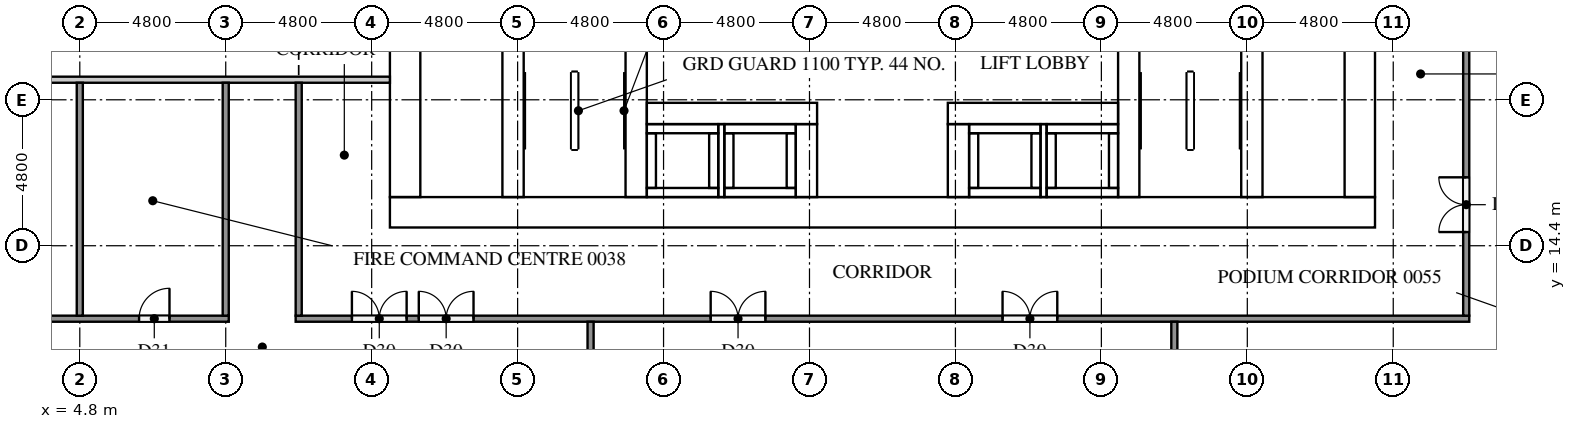
"""IFC4 building model, lengths in metres.
Left out: names, types, materials, properties, quantities, classifications, styles, units other than length and angle.
Written with IfcOpenShell. Run it as: python <this file> out.ifc"""

import sys

from ifc_helpers import new_model, si_unit, direction, frame, frame_2d, origin, place, context, subcontext, project, spatial, rectangle, extrude, element, fill, save


model = new_model("IFC4")
c1 = context("Model", 3, precision=1e-05, world=origin(), true_north=direction((0.0, 1.0)))
c2 = subcontext(c1, "Body", "Model", "MODEL_VIEW")
j1 = project(units=[si_unit("LENGTHUNIT", "METRE"), si_unit("PLANEANGLEUNIT", "RADIAN")], contexts=[c1])
p1 = place(None, origin())
s1 = spatial("IfcSite", under=j1, at=p1, CompositionType="ELEMENT")
p2 = place(p1, origin())
s2 = spatial("IfcBuilding", under=s1, at=p2, CompositionType="ELEMENT")
p3 = place(p2, origin())
s3 = spatial("IfcBuildingStorey", under=s2, at=p3, CompositionType="ELEMENT", Elevation=0.0)
p4 = place(p3, frame((15.0, 15.5, 0.0), z_axis=(0.0, 0.0, 1.0), x_axis=(1.0, 0.0, 0.0)))
e1 = element("IfcWall", 1, at=p4, inside=s3, PredefinedType="SHEAR", context=c2, shape_type="SweptSolid", body=[
    extrude(rectangle(XDim=32.4, YDim=1.0, at=frame_2d((16.2, 0.0))), origin(), (0.0, 0.0, 1.0), 5.7),
])
p5 = place(p4, frame((15.3, 0.0, 0.0)))
e2 = element("IfcOpeningElement", 2, at=p5, cuts=e1, PredefinedType="OPENING", context=c2, shape_type="SweptSolid", body=[
    extrude(rectangle(XDim=1.8, YDim=2.1, at=frame_2d((0.9, 1.05))), frame((0.0, 0.51, 0.0), z_axis=(0.0, -1.0, 0.0), x_axis=(1.0, 0.0, 0.0)), (0.0, 0.0, 1.0), 1.02),
])
p6 = place(p3, frame((15.5, 16.0, 0.0), z_axis=(0.0, 0.0, 1.0), x_axis=(0.0, 1.0, 0.0)))
e3 = element("IfcWall", 3, at=p6, inside=s3, PredefinedType="SHEAR", context=c2, shape_type="SweptSolid", body=[
    extrude(rectangle(XDim=20.8, YDim=1.0, at=frame_2d((10.4, 0.0))), origin(), (0.0, 0.0, 1.0), 5.7),
])
p7 = place(p6, frame((4.76, 0.0, 0.0)))
e4 = element("IfcOpeningElement", 4, at=p7, cuts=e3, PredefinedType="OPENING", context=c2, shape_type="SweptSolid", body=[
    extrude(rectangle(XDim=1.2, YDim=2.1, at=frame_2d((0.6, 1.05))), frame((0.0, 0.51, 0.0), z_axis=(0.0, -1.0, 0.0), x_axis=(1.0, 0.0, 0.0)), (0.0, 0.0, 1.0), 1.02),
])
p8 = place(p3, frame((46.9, 16.0, 0.0), z_axis=(0.0, 0.0, 1.0), x_axis=(0.0, 1.0, 0.0)))
e5 = element("IfcWall", 5, at=p8, inside=s3, PredefinedType="SHEAR", context=c2, shape_type="SweptSolid", body=[
    extrude(rectangle(XDim=20.8, YDim=1.0, at=frame_2d((10.4, 0.0))), origin(), (0.0, 0.0, 1.0), 5.7),
])
p9 = place(p8, frame((10.1, 0.0, 0.0)))
e6 = element("IfcOpeningElement", 6, at=p9, cuts=e5, PredefinedType="OPENING", context=c2, shape_type="SweptSolid", body=[
    extrude(rectangle(XDim=1.2, YDim=2.1, at=frame_2d((0.6, 1.05))), frame((0.0, 0.51, 0.0), z_axis=(0.0, -1.0, 0.0), x_axis=(1.0, 0.0, 0.0)), (0.0, 0.0, 1.0), 1.02),
])
p10 = place(p3, frame((19.05, 16.0, 0.0), z_axis=(0.0, 0.0, 1.0), x_axis=(0.0, 1.0, 0.0)))
e7 = element("IfcWall", 7, at=p10, inside=s3, PredefinedType="SHEAR", context=c2, shape_type="SweptSolid", body=[
    extrude(rectangle(XDim=14.9, YDim=0.7, at=frame_2d((7.45, 0.0))), origin(), (0.0, 0.0, 1.0), 5.7),
])
p11 = place(p10, frame((9.45, 0.0, 0.0)))
e8 = element("IfcOpeningElement", 8, at=p11, cuts=e7, PredefinedType="OPENING", context=c2, shape_type="SweptSolid", body=[
    extrude(rectangle(XDim=1.1, YDim=2.1, at=frame_2d((0.55, 1.05))), frame((0.0, 0.36, 0.0), z_axis=(0.0, -1.0, 0.0), x_axis=(1.0, 0.0, 0.0)), (0.0, 0.0, 1.0), 0.72),
])
p12 = place(p10, frame((12.95, 0.0, 0.0)))
e9 = element("IfcOpeningElement", 9, at=p12, cuts=e7, PredefinedType="OPENING", context=c2, shape_type="SweptSolid", body=[
    extrude(rectangle(XDim=1.1, YDim=2.1, at=frame_2d((0.55, 1.05))), frame((0.0, 0.36, 0.0), z_axis=(0.0, -1.0, 0.0), x_axis=(1.0, 0.0, 0.0)), (0.0, 0.0, 1.0), 0.72),
])
p13 = place(p10, frame((0.2, 0.0, 0.0)))
e10 = element("IfcOpeningElement", 10, at=p13, cuts=e7, PredefinedType="OPENING", context=c2, shape_type="SweptSolid", body=[
    extrude(rectangle(XDim=1.2, YDim=2.1, at=frame_2d((0.6, 1.05))), frame((0.0, 0.36, 0.0), z_axis=(0.0, -1.0, 0.0), x_axis=(1.0, 0.0, 0.0)), (0.0, 0.0, 1.0), 0.72),
])
p14 = place(p3, frame((23.1, 16.0, 0.0), z_axis=(0.0, 0.0, 1.0), x_axis=(0.0, 1.0, 0.0)))
e11 = element("IfcWall", 11, at=p14, inside=s3, PredefinedType="SHEAR", context=c2, shape_type="SweptSolid", body=[
    extrude(rectangle(XDim=20.8, YDim=0.7, at=frame_2d((10.4, 0.0))), origin(), (0.0, 0.0, 1.0), 5.7),
])
p15 = place(p3, frame((39.3, 16.0, 0.0), z_axis=(0.0, 0.0, 1.0), x_axis=(0.0, 1.0, 0.0)))
e12 = element("IfcWall", 12, at=p15, inside=s3, PredefinedType="SHEAR", context=c2, shape_type="SweptSolid", body=[
    extrude(rectangle(XDim=8.25, YDim=0.7, at=frame_2d((4.125, 0.0))), origin(), (0.0, 0.0, 1.0), 5.7),
])
p16 = place(p3, frame((43.35, 16.0, 0.0), z_axis=(0.0, 0.0, 1.0), x_axis=(0.0, 1.0, 0.0)))
e13 = element("IfcWall", 13, at=p16, inside=s3, PredefinedType="SHEAR", context=c2, shape_type="SweptSolid", body=[
    extrude(rectangle(XDim=8.25, YDim=0.7, at=frame_2d((4.125, 0.0))), origin(), (0.0, 0.0, 1.0), 5.7),
])
p17 = place(p16, frame((0.2, 0.0, 0.0)))
e14 = element("IfcOpeningElement", 14, at=p17, cuts=e13, PredefinedType="OPENING", context=c2, shape_type="SweptSolid", body=[
    extrude(rectangle(XDim=1.2, YDim=2.1, at=frame_2d((0.6, 1.05))), frame((0.0, 0.36, 0.0), z_axis=(0.0, -1.0, 0.0), x_axis=(1.0, 0.0, 0.0)), (0.0, 0.0, 1.0), 0.72),
])
p18 = place(p3, frame((23.45, 18.75, 0.0), z_axis=(0.0, 0.0, 1.0), x_axis=(1.0, 0.0, 0.0)))
e15 = element("IfcWall", 15, at=p18, inside=s3, PredefinedType="SHEAR", context=c2, shape_type="SweptSolid", body=[
    extrude(rectangle(XDim=5.6, YDim=0.7, at=frame_2d((2.8, 0.0))), origin(), (0.0, 0.0, 1.0), 5.7),
])
p19 = place(p18, frame((0.625, 0.0, 0.0)))
e16 = element("IfcOpeningElement", 16, at=p19, cuts=e15, PredefinedType="OPENING", context=c2, shape_type="SweptSolid", body=[
    extrude(rectangle(XDim=1.1, YDim=2.1, at=frame_2d((0.55, 1.05))), frame((0.0, 0.36, 0.0), z_axis=(0.0, -1.0, 0.0), x_axis=(1.0, 0.0, 0.0)), (0.0, 0.0, 1.0), 0.72),
])
p20 = place(p18, frame((3.175, 0.0, 0.0)))
e17 = element("IfcOpeningElement", 17, at=p20, cuts=e15, PredefinedType="OPENING", context=c2, shape_type="SweptSolid", body=[
    extrude(rectangle(XDim=1.1, YDim=2.1, at=frame_2d((0.55, 1.05))), frame((0.0, 0.36, 0.0), z_axis=(0.0, -1.0, 0.0), x_axis=(1.0, 0.0, 0.0)), (0.0, 0.0, 1.0), 0.72),
])
p21 = place(p3, frame((33.35, 18.75, 0.0), z_axis=(0.0, 0.0, 1.0), x_axis=(1.0, 0.0, 0.0)))
e18 = element("IfcWall", 18, at=p21, inside=s3, PredefinedType="SHEAR", context=c2, shape_type="SweptSolid", body=[
    extrude(rectangle(XDim=5.6, YDim=0.7, at=frame_2d((2.8, 0.0))), origin(), (0.0, 0.0, 1.0), 5.7),
])
p22 = place(p21, frame((1.325, 0.0, 0.0)))
e19 = element("IfcOpeningElement", 19, at=p22, cuts=e18, PredefinedType="OPENING", context=c2, shape_type="SweptSolid", body=[
    extrude(rectangle(XDim=1.1, YDim=2.1, at=frame_2d((0.55, 1.05))), frame((0.0, 0.36, 0.0), z_axis=(0.0, -1.0, 0.0), x_axis=(1.0, 0.0, 0.0)), (0.0, 0.0, 1.0), 0.72),
])
p23 = place(p21, frame((3.875, 0.0, 0.0)))
e20 = element("IfcOpeningElement", 20, at=p23, cuts=e18, PredefinedType="OPENING", context=c2, shape_type="SweptSolid", body=[
    extrude(rectangle(XDim=1.1, YDim=2.1, at=frame_2d((0.55, 1.05))), frame((0.0, 0.36, 0.0), z_axis=(0.0, -1.0, 0.0), x_axis=(1.0, 0.0, 0.0)), (0.0, 0.0, 1.0), 0.72),
])
for number, where, z_axis, x_axis in (
    (21, (28.7, 16.0, 0.0), (0.0, 0.0, 1.0), (0.0, 1.0, 0.0)),
    (22, (33.7, 16.0, 0.0), (0.0, 0.0, 1.0), (0.0, 1.0, 0.0)),
):
    element("IfcWall", number, at=place(p3, frame(where, z_axis=z_axis, x_axis=x_axis)), inside=s3, PredefinedType="SHEAR", context=c2, shape_type="SweptSolid", body=[
        extrude(rectangle(XDim=2.4, YDim=0.7, at=frame_2d((1.2, 0.0))), origin(), (0.0, 0.0, 1.0), 5.7),
    ])
for number, where, z_axis, x_axis in (
    (23, (23.45, 16.15, -1.8), (0.0, 0.0, 1.0), (1.0, 0.0, 0.0)),
    (24, (23.45, 18.25, -1.8), (0.0, 0.0, 1.0), (1.0, 0.0, 0.0)),
):
    element("IfcWall", number, at=place(p3, frame(where, z_axis=z_axis, x_axis=x_axis)), inside=s3, PredefinedType="SOLIDWALL", context=c2, shape_type="SweptSolid", body=[
        extrude(rectangle(XDim=2.35, YDim=0.3, at=frame_2d((1.175, 0.0))), origin(), (0.0, 0.0, 1.0), 1.8),
    ])
for number, where, z_axis, x_axis in (
    (25, (23.6, 16.3, -1.8), (0.0, 0.0, 1.0), (0.0, 1.0, 0.0)),
    (26, (25.65, 16.3, -1.8), (0.0, 0.0, 1.0), (0.0, 1.0, 0.0)),
):
    element("IfcWall", number, at=place(p3, frame(where, z_axis=z_axis, x_axis=x_axis)), inside=s3, PredefinedType="SOLIDWALL", context=c2, shape_type="SweptSolid", body=[
        extrude(rectangle(XDim=1.8, YDim=0.3, at=frame_2d((0.9, 0.0))), origin(), (0.0, 0.0, 1.0), 1.8),
    ])
for number, where, z_axis, x_axis in (
    (27, (26.0, 16.15, -1.8), (0.0, 0.0, 1.0), (1.0, 0.0, 0.0)),
    (28, (26.0, 18.25, -1.8), (0.0, 0.0, 1.0), (1.0, 0.0, 0.0)),
):
    element("IfcWall", number, at=place(p3, frame(where, z_axis=z_axis, x_axis=x_axis)), inside=s3, PredefinedType="SOLIDWALL", context=c2, shape_type="SweptSolid", body=[
        extrude(rectangle(XDim=2.35, YDim=0.3, at=frame_2d((1.175, 0.0))), origin(), (0.0, 0.0, 1.0), 1.8),
    ])
for number, where, z_axis, x_axis in (
    (29, (26.15, 16.3, -1.8), (0.0, 0.0, 1.0), (0.0, 1.0, 0.0)),
    (30, (28.2, 16.3, -1.8), (0.0, 0.0, 1.0), (0.0, 1.0, 0.0)),
):
    element("IfcWall", number, at=place(p3, frame(where, z_axis=z_axis, x_axis=x_axis)), inside=s3, PredefinedType="SOLIDWALL", context=c2, shape_type="SweptSolid", body=[
        extrude(rectangle(XDim=1.8, YDim=0.3, at=frame_2d((0.9, 0.0))), origin(), (0.0, 0.0, 1.0), 1.8),
    ])
for number, where, z_axis, x_axis in (
    (31, (34.05, 16.15, -1.8), (0.0, 0.0, 1.0), (1.0, 0.0, 0.0)),
    (32, (34.05, 18.25, -1.8), (0.0, 0.0, 1.0), (1.0, 0.0, 0.0)),
):
    element("IfcWall", number, at=place(p3, frame(where, z_axis=z_axis, x_axis=x_axis)), inside=s3, PredefinedType="SOLIDWALL", context=c2, shape_type="SweptSolid", body=[
        extrude(rectangle(XDim=2.35, YDim=0.3, at=frame_2d((1.175, 0.0))), origin(), (0.0, 0.0, 1.0), 1.8),
    ])
for number, where, z_axis, x_axis in (
    (33, (34.2, 16.3, -1.8), (0.0, 0.0, 1.0), (0.0, 1.0, 0.0)),
    (34, (36.25, 16.3, -1.8), (0.0, 0.0, 1.0), (0.0, 1.0, 0.0)),
):
    element("IfcWall", number, at=place(p3, frame(where, z_axis=z_axis, x_axis=x_axis)), inside=s3, PredefinedType="SOLIDWALL", context=c2, shape_type="SweptSolid", body=[
        extrude(rectangle(XDim=1.8, YDim=0.3, at=frame_2d((0.9, 0.0))), origin(), (0.0, 0.0, 1.0), 1.8),
    ])
for number, where, z_axis, x_axis in (
    (35, (36.6, 16.15, -1.8), (0.0, 0.0, 1.0), (1.0, 0.0, 0.0)),
    (36, (36.6, 18.25, -1.8), (0.0, 0.0, 1.0), (1.0, 0.0, 0.0)),
):
    element("IfcWall", number, at=place(p3, frame(where, z_axis=z_axis, x_axis=x_axis)), inside=s3, PredefinedType="SOLIDWALL", context=c2, shape_type="SweptSolid", body=[
        extrude(rectangle(XDim=2.35, YDim=0.3, at=frame_2d((1.175, 0.0))), origin(), (0.0, 0.0, 1.0), 1.8),
    ])
for number, where, z_axis, x_axis in (
    (37, (36.75, 16.3, -1.8), (0.0, 0.0, 1.0), (0.0, 1.0, 0.0)),
    (38, (38.8, 16.3, -1.8), (0.0, 0.0, 1.0), (0.0, 1.0, 0.0)),
):
    element("IfcWall", number, at=place(p3, frame(where, z_axis=z_axis, x_axis=x_axis)), inside=s3, PredefinedType="SOLIDWALL", context=c2, shape_type="SweptSolid", body=[
        extrude(rectangle(XDim=1.8, YDim=0.3, at=frame_2d((0.9, 0.0))), origin(), (0.0, 0.0, 1.0), 1.8),
    ])
for number, where, z_axis, x_axis in (
    (39, (25.9, 16.0, 0.0), (0.0, 0.0, 1.0), (0.0, 1.0, 0.0)),
    (40, (36.5, 16.0, 0.0), (0.0, 0.0, 1.0), (0.0, 1.0, 0.0)),
):
    element("IfcWall", number, at=place(p3, frame(where, z_axis=z_axis, x_axis=x_axis)), inside=s3, PredefinedType="SOLIDWALL", context=c2, shape_type="SweptSolid", body=[
        extrude(rectangle(XDim=2.4, YDim=0.2, at=frame_2d((1.2, 0.0))), origin(), (0.0, 0.0, 1.0), 5.7),
    ])
p24 = place(p3, frame((-6.9, 19.86, 0.0), z_axis=(0.0, 0.0, 1.0), x_axis=(1.0, 0.0, 0.0)))
e41 = element("IfcWall", 41, at=p24, inside=s3, PredefinedType="PARTITIONING", context=c2, shape_type="SweptSolid", body=[
    extrude(rectangle(XDim=21.9, YDim=0.2, at=frame_2d((10.95, 0.0))), origin(), (0.0, 0.0, 1.0), 5.7),
])
p25 = place(p24, frame((2.9, 0.0, 0.0)))
e42 = element("IfcOpeningElement", 42, at=p25, cuts=e41, PredefinedType="OPENING", context=c2, shape_type="SweptSolid", body=[
    extrude(rectangle(XDim=1.0, YDim=2.1, at=frame_2d((0.5, 1.05))), frame((0.0, 0.11, 0.0), z_axis=(0.0, -1.0, 0.0), x_axis=(1.0, 0.0, 0.0)), (0.0, 0.0, 1.0), 0.22),
])
p26 = place(p3, frame((-4.9, 12.0, 0.0), z_axis=(0.0, 0.0, 1.0), x_axis=(1.0, 0.0, 0.0)))
e43 = element("IfcWall", 43, at=p26, inside=s3, PredefinedType="PARTITIONING", context=c2, shape_type="SweptSolid", body=[
    extrude(rectangle(XDim=14.6, YDim=0.2, at=frame_2d((7.3, 0.0))), origin(), (0.0, 0.0, 1.0), 5.7),
])
p27 = place(p26, frame((11.65, 0.0, 0.0)))
e44 = element("IfcOpeningElement", 44, at=p27, cuts=e43, PredefinedType="OPENING", context=c2, shape_type="SweptSolid", body=[
    extrude(rectangle(XDim=1.0, YDim=2.1, at=frame_2d((0.5, 1.05))), frame((0.0, 0.11, 0.0), z_axis=(0.0, -1.0, 0.0), x_axis=(1.0, 0.0, 0.0)), (0.0, 0.0, 1.0), 0.22),
])
p28 = place(p26, frame((4.35, 0.0, 0.0)))
e45 = element("IfcOpeningElement", 45, at=p28, cuts=e43, PredefinedType="OPENING", context=c2, shape_type="SweptSolid", body=[
    extrude(rectangle(XDim=1.0, YDim=2.1, at=frame_2d((0.5, 1.05))), frame((0.0, 0.11, 0.0), z_axis=(0.0, -1.0, 0.0), x_axis=(1.0, 0.0, 0.0)), (0.0, 0.0, 1.0), 0.22),
])
p29 = place(p3, frame((11.9, 12.0, 0.0), z_axis=(0.0, 0.0, 1.0), x_axis=(1.0, 0.0, 0.0)))
e46 = element("IfcWall", 46, at=p29, inside=s3, PredefinedType="PARTITIONING", context=c2, shape_type="SweptSolid", body=[
    extrude(rectangle(XDim=38.6, YDim=0.2, at=frame_2d((19.3, 0.0))), origin(), (0.0, 0.0, 1.0), 5.7),
])
p30 = place(p29, frame((1.85, 0.0, 0.0)))
e47 = element("IfcOpeningElement", 47, at=p30, cuts=e46, PredefinedType="OPENING", context=c2, shape_type="SweptSolid", body=[
    extrude(rectangle(XDim=1.8, YDim=2.1, at=frame_2d((0.9, 1.05))), frame((0.0, 0.11, 0.0), z_axis=(0.0, -1.0, 0.0), x_axis=(1.0, 0.0, 0.0)), (0.0, 0.0, 1.0), 0.22),
])
p31 = place(p29, frame((23.25, 0.0, 0.0)))
e48 = element("IfcOpeningElement", 48, at=p31, cuts=e46, PredefinedType="OPENING", context=c2, shape_type="SweptSolid", body=[
    extrude(rectangle(XDim=1.8, YDim=2.1, at=frame_2d((0.9, 1.05))), frame((0.0, 0.11, 0.0), z_axis=(0.0, -1.0, 0.0), x_axis=(1.0, 0.0, 0.0)), (0.0, 0.0, 1.0), 0.22),
])
p32 = place(p29, frame((13.65, 0.0, 0.0)))
e49 = element("IfcOpeningElement", 49, at=p32, cuts=e46, PredefinedType="OPENING", context=c2, shape_type="SweptSolid", body=[
    extrude(rectangle(XDim=1.8, YDim=2.1, at=frame_2d((0.9, 1.05))), frame((0.0, 0.11, 0.0), z_axis=(0.0, -1.0, 0.0), x_axis=(1.0, 0.0, 0.0)), (0.0, 0.0, 1.0), 0.22),
])
p33 = place(p29, frame((4.05, 0.0, 0.0)))
e50 = element("IfcOpeningElement", 50, at=p33, cuts=e46, PredefinedType="OPENING", context=c2, shape_type="SweptSolid", body=[
    extrude(rectangle(XDim=1.8, YDim=2.1, at=frame_2d((0.9, 1.05))), frame((0.0, 0.11, 0.0), z_axis=(0.0, -1.0, 0.0), x_axis=(1.0, 0.0, 0.0)), (0.0, 0.0, 1.0), 0.22),
])
for number, where, z_axis, x_axis in (
    (51, (4.8, 12.1, 0.0), (0.0, 0.0, 1.0), (0.0, 1.0, 0.0)),
    (52, (9.6, 12.1, 0.0), (0.0, 0.0, 1.0), (0.0, 1.0, 0.0)),
    (53, (12.0, 12.1, 0.0), (0.0, 0.0, 1.0), (0.0, 1.0, 0.0)),
):
    element("IfcWall", number, at=place(p3, frame(where, z_axis=z_axis, x_axis=x_axis)), inside=s3, PredefinedType="PARTITIONING", context=c2, shape_type="SweptSolid", body=[
        extrude(rectangle(XDim=7.66, YDim=0.2, at=frame_2d((3.83, 0.0))), origin(), (0.0, 0.0, 1.0), 5.7),
    ])
for number, where, z_axis, x_axis in (
    (54, (21.6, 9.6, 0.0), (0.0, 0.0, 1.0), (0.0, 1.0, 0.0)),
    (55, (40.8, 9.6, 0.0), (0.0, 0.0, 1.0), (0.0, 1.0, 0.0)),
):
    element("IfcWall", number, at=place(p3, frame(where, z_axis=z_axis, x_axis=x_axis)), inside=s3, PredefinedType="PARTITIONING", context=c2, shape_type="SweptSolid", body=[
        extrude(rectangle(XDim=2.3, YDim=0.2, at=frame_2d((1.15, 0.0))), origin(), (0.0, 0.0, 1.0), 5.7),
    ])
p34 = place(p3, frame((50.4, 12.1, 0.0), z_axis=(0.0, 0.0, 1.0), x_axis=(0.0, 1.0, 0.0)))
e56 = element("IfcWall", 56, at=p34, inside=s3, PredefinedType="PARTITIONING", context=c2, shape_type="SweptSolid", body=[
    extrude(rectangle(XDim=13.0, YDim=0.2, at=frame_2d((6.5, 0.0))), origin(), (0.0, 0.0, 1.0), 5.7),
])
p35 = place(p34, frame((2.75, 0.0, 0.0)))
e57 = element("IfcOpeningElement", 57, at=p35, cuts=e56, PredefinedType="OPENING", context=c2, shape_type="SweptSolid", body=[
    extrude(rectangle(XDim=1.8, YDim=2.1, at=frame_2d((0.9, 1.05))), frame((0.0, 0.11, 0.0), z_axis=(0.0, -1.0, 0.0), x_axis=(1.0, 0.0, 0.0)), (0.0, 0.0, 1.0), 0.22),
])
p36 = place(p19, origin())
e58 = element("IfcDoor", 58, at=p36, inside=s3, OperationType="DOUBLE_DOOR_SLIDING", PredefinedType="DOOR", context=c2, shape_type="SweptSolid", body=[
    extrude(rectangle(XDim=1.1, YDim=2.1, at=frame_2d((0.55, 1.05))), frame((0.0, 0.025, 0.0), z_axis=(0.0, -1.0, 0.0), x_axis=(1.0, 0.0, 0.0)), (0.0, 0.0, 1.0), 0.05),
])
fill(e16, e58)
p37 = place(p20, origin())
e59 = element("IfcDoor", 59, at=p37, inside=s3, OperationType="DOUBLE_DOOR_SLIDING", PredefinedType="DOOR", context=c2, shape_type="SweptSolid", body=[
    extrude(rectangle(XDim=1.1, YDim=2.1, at=frame_2d((0.55, 1.05))), frame((0.0, 0.025, 0.0), z_axis=(0.0, -1.0, 0.0), x_axis=(1.0, 0.0, 0.0)), (0.0, 0.0, 1.0), 0.05),
])
fill(e17, e59)
p38 = place(p22, origin())
e60 = element("IfcDoor", 60, at=p38, inside=s3, OperationType="DOUBLE_DOOR_SLIDING", PredefinedType="DOOR", context=c2, shape_type="SweptSolid", body=[
    extrude(rectangle(XDim=1.1, YDim=2.1, at=frame_2d((0.55, 1.05))), frame((0.0, 0.025, 0.0), z_axis=(0.0, -1.0, 0.0), x_axis=(1.0, 0.0, 0.0)), (0.0, 0.0, 1.0), 0.05),
])
fill(e19, e60)
p39 = place(p23, origin())
e61 = element("IfcDoor", 61, at=p39, inside=s3, OperationType="DOUBLE_DOOR_SLIDING", PredefinedType="DOOR", context=c2, shape_type="SweptSolid", body=[
    extrude(rectangle(XDim=1.1, YDim=2.1, at=frame_2d((0.55, 1.05))), frame((0.0, 0.025, 0.0), z_axis=(0.0, -1.0, 0.0), x_axis=(1.0, 0.0, 0.0)), (0.0, 0.0, 1.0), 0.05),
])
fill(e20, e61)
p40 = place(p13, origin())
e62 = element("IfcDoor", 62, at=p40, inside=s3, OperationType="SINGLE_SWING_RIGHT", PredefinedType="DOOR", context=c2, shape_type="SweptSolid", body=[
    extrude(rectangle(XDim=1.2, YDim=2.1, at=frame_2d((0.6, 1.05))), frame((0.0, 0.025, 0.0), z_axis=(0.0, -1.0, 0.0), x_axis=(1.0, 0.0, 0.0)), (0.0, 0.0, 1.0), 0.05),
])
fill(e10, e62)
p41 = place(p17, frame((1.2, 0.0, 0.0), z_axis=(0.0, 0.0, 1.0), x_axis=(-1.0, 0.0, 0.0)))
e63 = element("IfcDoor", 63, at=p41, inside=s3, OperationType="SINGLE_SWING_LEFT", PredefinedType="DOOR", context=c2, shape_type="SweptSolid", body=[
    extrude(rectangle(XDim=1.2, YDim=2.1, at=frame_2d((0.6, 1.05))), frame((0.0, 0.025, 0.0), z_axis=(0.0, -1.0, 0.0), x_axis=(1.0, 0.0, 0.0)), (0.0, 0.0, 1.0), 0.05),
])
fill(e14, e63)
p42 = place(p5, frame((1.8, 0.0, 0.0), z_axis=(0.0, 0.0, 1.0), x_axis=(-1.0, 0.0, 0.0)))
e64 = element("IfcDoor", 64, at=p42, inside=s3, OperationType="DOUBLE_DOOR_SINGLE_SWING", PredefinedType="DOOR", context=c2, shape_type="SweptSolid", body=[
    extrude(rectangle(XDim=1.8, YDim=2.1, at=frame_2d((0.9, 1.05))), frame((0.0, 0.025, 0.0), z_axis=(0.0, -1.0, 0.0), x_axis=(1.0, 0.0, 0.0)), (0.0, 0.0, 1.0), 0.05),
])
fill(e2, e64)
p43 = place(p30, origin())
e65 = element("IfcDoor", 65, at=p43, inside=s3, OperationType="DOUBLE_DOOR_SINGLE_SWING", PredefinedType="DOOR", context=c2, shape_type="SweptSolid", body=[
    extrude(rectangle(XDim=1.8, YDim=2.1, at=frame_2d((0.9, 1.05))), frame((0.0, 0.025, 0.0), z_axis=(0.0, -1.0, 0.0), x_axis=(1.0, 0.0, 0.0)), (0.0, 0.0, 1.0), 0.05),
])
fill(e47, e65)
p44 = place(p35, origin())
e66 = element("IfcDoor", 66, at=p44, inside=s3, OperationType="DOUBLE_DOOR_SINGLE_SWING", PredefinedType="DOOR", context=c2, shape_type="SweptSolid", body=[
    extrude(rectangle(XDim=1.8, YDim=2.1, at=frame_2d((0.9, 1.05))), frame((0.0, 0.025, 0.0), z_axis=(0.0, -1.0, 0.0), x_axis=(1.0, 0.0, 0.0)), (0.0, 0.0, 1.0), 0.05),
])
fill(e57, e66)
p45 = place(p27, origin())
e67 = element("IfcDoor", 67, at=p45, inside=s3, OperationType="SINGLE_SWING_RIGHT", PredefinedType="DOOR", context=c2, shape_type="SweptSolid", body=[
    extrude(rectangle(XDim=1.0, YDim=2.1, at=frame_2d((0.5, 1.05))), frame((0.0, 0.025, 0.0), z_axis=(0.0, -1.0, 0.0), x_axis=(1.0, 0.0, 0.0)), (0.0, 0.0, 1.0), 0.05),
])
fill(e44, e67)
p46 = place(p31, origin())
e68 = element("IfcDoor", 68, at=p46, inside=s3, OperationType="DOUBLE_DOOR_SINGLE_SWING", PredefinedType="DOOR", context=c2, shape_type="SweptSolid", body=[
    extrude(rectangle(XDim=1.8, YDim=2.1, at=frame_2d((0.9, 1.05))), frame((0.0, 0.025, 0.0), z_axis=(0.0, -1.0, 0.0), x_axis=(1.0, 0.0, 0.0)), (0.0, 0.0, 1.0), 0.05),
])
fill(e48, e68)
p47 = place(p32, origin())
e69 = element("IfcDoor", 69, at=p47, inside=s3, OperationType="DOUBLE_DOOR_SINGLE_SWING", PredefinedType="DOOR", context=c2, shape_type="SweptSolid", body=[
    extrude(rectangle(XDim=1.8, YDim=2.1, at=frame_2d((0.9, 1.05))), frame((0.0, 0.025, 0.0), z_axis=(0.0, -1.0, 0.0), x_axis=(1.0, 0.0, 0.0)), (0.0, 0.0, 1.0), 0.05),
])
fill(e49, e69)
p48 = place(p33, origin())
e70 = element("IfcDoor", 70, at=p48, inside=s3, OperationType="DOUBLE_DOOR_SINGLE_SWING", PredefinedType="DOOR", context=c2, shape_type="SweptSolid", body=[
    extrude(rectangle(XDim=1.8, YDim=2.1, at=frame_2d((0.9, 1.05))), frame((0.0, 0.025, 0.0), z_axis=(0.0, -1.0, 0.0), x_axis=(1.0, 0.0, 0.0)), (0.0, 0.0, 1.0), 0.05),
])
fill(e50, e70)
save(model, sys.argv[1])
